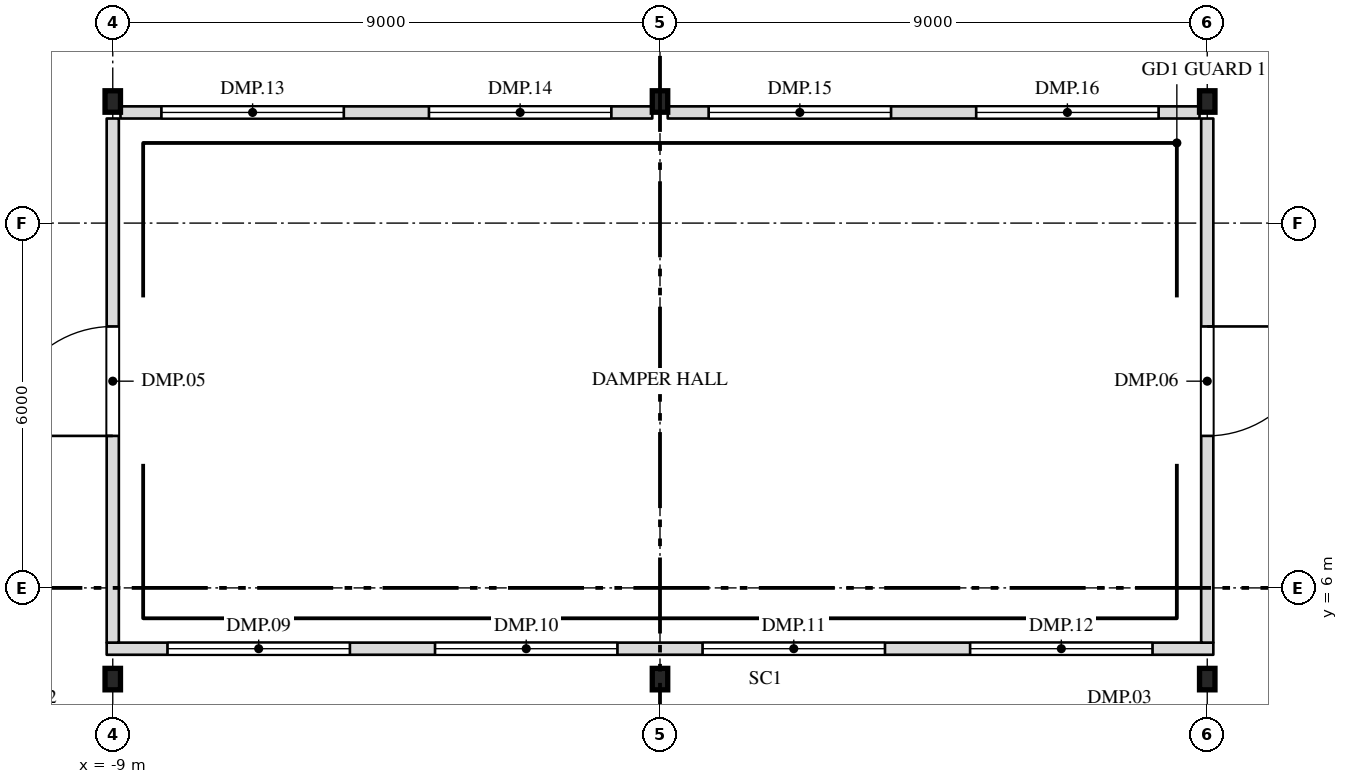
"""IFC4 building model, lengths in metres.
Left out: names, types, materials, properties, quantities, classifications, styles, units other than length and angle.
Written with IfcOpenShell. Run it as: python <this file> out.ifc"""

import sys

from ifc_helpers import new_model, si_unit, direction, frame, frame_2d, origin, origin_2d, place, context, subcontext, project, spatial, rectangle, i_section, extrude, element, fill, save


model = new_model("IFC4")
c1 = context("Model", 3, precision=1e-05, world=origin(), true_north=direction((0.0, 1.0)))
c2 = subcontext(c1, "Body", "Model", "MODEL_VIEW")
j1 = project(units=[si_unit("LENGTHUNIT", "METRE"), si_unit("PLANEANGLEUNIT", "RADIAN")], contexts=[c1])
p1 = place(None, origin())
s1 = spatial("IfcSite", under=j1, at=p1, CompositionType="ELEMENT")
p2 = place(p1, origin())
s2 = spatial("IfcBuilding", under=s1, at=p2, CompositionType="ELEMENT")
p3 = place(p2, frame((0.0, 0.0, 296.5)))
s3 = spatial("IfcBuildingStorey", under=s2, at=p3, CompositionType="ELEMENT", Elevation=296.5)
for number, where, z_axis, x_axis in (
    (1, (-9.0, 4.5, 0.0), (0.0, 0.0, 1.0), (1.0, 0.0, 0.0)),
    (2, (0.0, 4.5, 0.0), (0.0, 0.0, 1.0), (1.0, 0.0, 0.0)),
    (3, (9.0, 4.5, 0.0), (0.0, 0.0, 1.0), (1.0, 0.0, 0.0)),
    (4, (-9.0, 14.0, 0.0), (0.0, 0.0, 1.0), (1.0, 0.0, 0.0)),
    (5, (0.0, 14.0, 0.0), (0.0, 0.0, 1.0), (1.0, 0.0, 0.0)),
    (6, (9.0, 14.0, 0.0), (0.0, 0.0, 1.0), (1.0, 0.0, 0.0)),
):
    element("IfcColumn", number, at=place(p3, frame(where, z_axis=z_axis, x_axis=x_axis)), inside=s3, PredefinedType="COLUMN", context=c2, shape_type="SweptSolid", body=[
        extrude(i_section(OverallWidth=0.254, OverallDepth=0.353, WebThickness=0.01, FlangeThickness=0.016, at=origin_2d()), origin(), (0.0, 0.0, 1.0), 9.0),
    ])
p4 = place(p3, frame((-9.1, 5.0, 0.0), z_axis=(0.0, 0.0, 1.0), x_axis=(1.0, 0.0, 0.0)))
e7 = element("IfcWall", 7, at=p4, inside=s3, PredefinedType="PARTITIONING", context=c2, shape_type="SweptSolid", body=[
    extrude(rectangle(XDim=18.2, YDim=0.2, at=frame_2d((9.1, 0.0))), origin(), (0.0, 0.0, 1.0), 8.65),
])
p5 = place(p4, frame((1.0, 0.0, 0.6)))
e8 = element("IfcOpeningElement", 8, at=p5, cuts=e7, PredefinedType="OPENING", context=c2, shape_type="SweptSolid", body=[
    extrude(rectangle(XDim=3.0, YDim=5.0, at=frame_2d((1.5, 2.5))), frame((0.0, 0.112, 0.0), z_axis=(0.0, -1.0, 0.0), x_axis=(1.0, 0.0, 0.0)), (0.0, 0.0, 1.0), 0.224),
])
p6 = place(p4, frame((5.4, 0.0, 0.6)))
e9 = element("IfcOpeningElement", 9, at=p6, cuts=e7, PredefinedType="OPENING", context=c2, shape_type="SweptSolid", body=[
    extrude(rectangle(XDim=3.0, YDim=5.0, at=frame_2d((1.5, 2.5))), frame((0.0, 0.112, 0.0), z_axis=(0.0, -1.0, 0.0), x_axis=(1.0, 0.0, 0.0)), (0.0, 0.0, 1.0), 0.224),
])
p7 = place(p4, frame((9.8, 0.0, 0.6)))
e10 = element("IfcOpeningElement", 10, at=p7, cuts=e7, PredefinedType="OPENING", context=c2, shape_type="SweptSolid", body=[
    extrude(rectangle(XDim=3.0, YDim=5.0, at=frame_2d((1.5, 2.5))), frame((0.0, 0.112, 0.0), z_axis=(0.0, -1.0, 0.0), x_axis=(1.0, 0.0, 0.0)), (0.0, 0.0, 1.0), 0.224),
])
p8 = place(p4, frame((14.2, 0.0, 0.6)))
e11 = element("IfcOpeningElement", 11, at=p8, cuts=e7, PredefinedType="OPENING", context=c2, shape_type="SweptSolid", body=[
    extrude(rectangle(XDim=3.0, YDim=5.0, at=frame_2d((1.5, 2.5))), frame((0.0, 0.112, 0.0), z_axis=(0.0, -1.0, 0.0), x_axis=(1.0, 0.0, 0.0)), (0.0, 0.0, 1.0), 0.224),
])
p9 = place(p3, frame((-9.0, 5.1, 0.0), z_axis=(0.0, 0.0, 1.0), x_axis=(0.0, 1.0, 0.0)))
e12 = element("IfcWall", 12, at=p9, inside=s3, PredefinedType="PARTITIONING", context=c2, shape_type="SweptSolid", body=[
    extrude(rectangle(XDim=8.62, YDim=0.2, at=frame_2d((4.31, 0.0))), origin(), (0.0, 0.0, 1.0), 8.038),
])
p10 = place(p9, frame((3.4, 0.0, 0.0)))
e13 = element("IfcOpeningElement", 13, at=p10, cuts=e12, PredefinedType="OPENING", context=c2, shape_type="SweptSolid", body=[
    extrude(rectangle(XDim=1.8, YDim=2.1, at=frame_2d((0.9, 1.05))), frame((0.0, 0.112, 0.0), z_axis=(0.0, -1.0, 0.0), x_axis=(1.0, 0.0, 0.0)), (0.0, 0.0, 1.0), 0.224),
])
p11 = place(p3, frame((9.0, 5.1, 0.0), z_axis=(0.0, 0.0, 1.0), x_axis=(0.0, 1.0, 0.0)))
e14 = element("IfcWall", 14, at=p11, inside=s3, PredefinedType="PARTITIONING", context=c2, shape_type="SweptSolid", body=[
    extrude(rectangle(XDim=8.62, YDim=0.2, at=frame_2d((4.31, 0.0))), origin(), (0.0, 0.0, 1.0), 8.038),
])
p12 = place(p11, frame((3.4, 0.0, 0.0)))
e15 = element("IfcOpeningElement", 15, at=p12, cuts=e14, PredefinedType="OPENING", context=c2, shape_type="SweptSolid", body=[
    extrude(rectangle(XDim=1.8, YDim=2.1, at=frame_2d((0.9, 1.05))), frame((0.0, 0.112, 0.0), z_axis=(0.0, -1.0, 0.0), x_axis=(1.0, 0.0, 0.0)), (0.0, 0.0, 1.0), 0.224),
])
p13 = place(p3, frame((-8.873, 13.82, 0.0), z_axis=(0.0, 0.0, 1.0), x_axis=(1.0, 0.0, 0.0)))
e16 = element("IfcWall", 16, at=p13, inside=s3, PredefinedType="PARTITIONING", context=c2, shape_type="SweptSolid", body=[
    extrude(rectangle(XDim=8.746, YDim=0.2, at=frame_2d((4.373, 0.0))), origin(), (0.0, 0.0, 1.0), 8.65),
])
p14 = place(p13, frame((0.673, 0.0, 0.6)))
e17 = element("IfcOpeningElement", 17, at=p14, cuts=e16, PredefinedType="OPENING", context=c2, shape_type="SweptSolid", body=[
    extrude(rectangle(XDim=3.0, YDim=5.0, at=frame_2d((1.5, 2.5))), frame((0.0, 0.112, 0.0), z_axis=(0.0, -1.0, 0.0), x_axis=(1.0, 0.0, 0.0)), (0.0, 0.0, 1.0), 0.224),
])
p15 = place(p13, frame((5.073, 0.0, 0.6)))
e18 = element("IfcOpeningElement", 18, at=p15, cuts=e16, PredefinedType="OPENING", context=c2, shape_type="SweptSolid", body=[
    extrude(rectangle(XDim=3.0, YDim=5.0, at=frame_2d((1.5, 2.5))), frame((0.0, 0.112, 0.0), z_axis=(0.0, -1.0, 0.0), x_axis=(1.0, 0.0, 0.0)), (0.0, 0.0, 1.0), 0.224),
])
p16 = place(p3, frame((0.127, 13.82, 0.0), z_axis=(0.0, 0.0, 1.0), x_axis=(1.0, 0.0, 0.0)))
e19 = element("IfcWall", 19, at=p16, inside=s3, PredefinedType="PARTITIONING", context=c2, shape_type="SweptSolid", body=[
    extrude(rectangle(XDim=8.746, YDim=0.2, at=frame_2d((4.373, 0.0))), origin(), (0.0, 0.0, 1.0), 8.65),
])
p17 = place(p16, frame((0.673, 0.0, 0.6)))
e20 = element("IfcOpeningElement", 20, at=p17, cuts=e19, PredefinedType="OPENING", context=c2, shape_type="SweptSolid", body=[
    extrude(rectangle(XDim=3.0, YDim=5.0, at=frame_2d((1.5, 2.5))), frame((0.0, 0.112, 0.0), z_axis=(0.0, -1.0, 0.0), x_axis=(1.0, 0.0, 0.0)), (0.0, 0.0, 1.0), 0.224),
])
p18 = place(p16, frame((5.073, 0.0, 0.6)))
e21 = element("IfcOpeningElement", 21, at=p18, cuts=e19, PredefinedType="OPENING", context=c2, shape_type="SweptSolid", body=[
    extrude(rectangle(XDim=3.0, YDim=5.0, at=frame_2d((1.5, 2.5))), frame((0.0, 0.112, 0.0), z_axis=(0.0, -1.0, 0.0), x_axis=(1.0, 0.0, 0.0)), (0.0, 0.0, 1.0), 0.224),
])
p19 = place(p10, origin())
e22 = element("IfcDoor", 22, at=p19, inside=s3, OperationType="DOUBLE_DOOR_SINGLE_SWING", PredefinedType="DOOR", context=c2, shape_type="SweptSolid", body=[
    extrude(rectangle(XDim=1.8, YDim=2.1, at=frame_2d((0.9, 1.05))), frame((0.0, 0.025, 0.0), z_axis=(0.0, -1.0, 0.0), x_axis=(1.0, 0.0, 0.0)), (0.0, 0.0, 1.0), 0.05),
])
fill(e13, e22)
p20 = place(p12, origin())
e23 = element("IfcDoor", 23, at=p20, inside=s3, OperationType="DOUBLE_DOOR_SINGLE_SWING", PredefinedType="DOOR", context=c2, shape_type="SweptSolid", body=[
    extrude(rectangle(XDim=1.8, YDim=2.1, at=frame_2d((0.9, 1.05))), frame((0.0, 0.025, 0.0), z_axis=(0.0, -1.0, 0.0), x_axis=(1.0, 0.0, 0.0)), (0.0, 0.0, 1.0), 0.05),
])
fill(e15, e23)
p21 = place(p5, origin())
e24 = element("IfcWindow", 24, at=p21, inside=s3, PartitioningType="SINGLE_PANEL", PredefinedType="WINDOW", context=c2, shape_type="SweptSolid", body=[
    extrude(rectangle(XDim=3.0, YDim=5.0, at=frame_2d((1.5, 2.5))), frame((0.0, 0.03, 0.0), z_axis=(0.0, -1.0, 0.0), x_axis=(1.0, 0.0, 0.0)), (0.0, 0.0, 1.0), 0.06),
])
fill(e8, e24)
p22 = place(p6, origin())
e25 = element("IfcWindow", 25, at=p22, inside=s3, PartitioningType="SINGLE_PANEL", PredefinedType="WINDOW", context=c2, shape_type="SweptSolid", body=[
    extrude(rectangle(XDim=3.0, YDim=5.0, at=frame_2d((1.5, 2.5))), frame((0.0, 0.03, 0.0), z_axis=(0.0, -1.0, 0.0), x_axis=(1.0, 0.0, 0.0)), (0.0, 0.0, 1.0), 0.06),
])
fill(e9, e25)
p23 = place(p7, origin())
e26 = element("IfcWindow", 26, at=p23, inside=s3, PartitioningType="SINGLE_PANEL", PredefinedType="WINDOW", context=c2, shape_type="SweptSolid", body=[
    extrude(rectangle(XDim=3.0, YDim=5.0, at=frame_2d((1.5, 2.5))), frame((0.0, 0.03, 0.0), z_axis=(0.0, -1.0, 0.0), x_axis=(1.0, 0.0, 0.0)), (0.0, 0.0, 1.0), 0.06),
])
fill(e10, e26)
p24 = place(p8, origin())
e27 = element("IfcWindow", 27, at=p24, inside=s3, PartitioningType="SINGLE_PANEL", PredefinedType="WINDOW", context=c2, shape_type="SweptSolid", body=[
    extrude(rectangle(XDim=3.0, YDim=5.0, at=frame_2d((1.5, 2.5))), frame((0.0, 0.03, 0.0), z_axis=(0.0, -1.0, 0.0), x_axis=(1.0, 0.0, 0.0)), (0.0, 0.0, 1.0), 0.06),
])
fill(e11, e27)
p25 = place(p14, origin())
e28 = element("IfcWindow", 28, at=p25, inside=s3, PartitioningType="SINGLE_PANEL", PredefinedType="WINDOW", context=c2, shape_type="SweptSolid", body=[
    extrude(rectangle(XDim=3.0, YDim=5.0, at=frame_2d((1.5, 2.5))), frame((0.0, 0.03, 0.0), z_axis=(0.0, -1.0, 0.0), x_axis=(1.0, 0.0, 0.0)), (0.0, 0.0, 1.0), 0.06),
])
fill(e17, e28)
p26 = place(p15, origin())
e29 = element("IfcWindow", 29, at=p26, inside=s3, PartitioningType="SINGLE_PANEL", PredefinedType="WINDOW", context=c2, shape_type="SweptSolid", body=[
    extrude(rectangle(XDim=3.0, YDim=5.0, at=frame_2d((1.5, 2.5))), frame((0.0, 0.03, 0.0), z_axis=(0.0, -1.0, 0.0), x_axis=(1.0, 0.0, 0.0)), (0.0, 0.0, 1.0), 0.06),
])
fill(e18, e29)
p27 = place(p17, origin())
e30 = element("IfcWindow", 30, at=p27, inside=s3, PartitioningType="SINGLE_PANEL", PredefinedType="WINDOW", context=c2, shape_type="SweptSolid", body=[
    extrude(rectangle(XDim=3.0, YDim=5.0, at=frame_2d((1.5, 2.5))), frame((0.0, 0.03, 0.0), z_axis=(0.0, -1.0, 0.0), x_axis=(1.0, 0.0, 0.0)), (0.0, 0.0, 1.0), 0.06),
])
fill(e20, e30)
p28 = place(p18, origin())
e31 = element("IfcWindow", 31, at=p28, inside=s3, PartitioningType="SINGLE_PANEL", PredefinedType="WINDOW", context=c2, shape_type="SweptSolid", body=[
    extrude(rectangle(XDim=3.0, YDim=5.0, at=frame_2d((1.5, 2.5))), frame((0.0, 0.03, 0.0), z_axis=(0.0, -1.0, 0.0), x_axis=(1.0, 0.0, 0.0)), (0.0, 0.0, 1.0), 0.06),
])
fill(e21, e31)
save(model, sys.argv[1])
